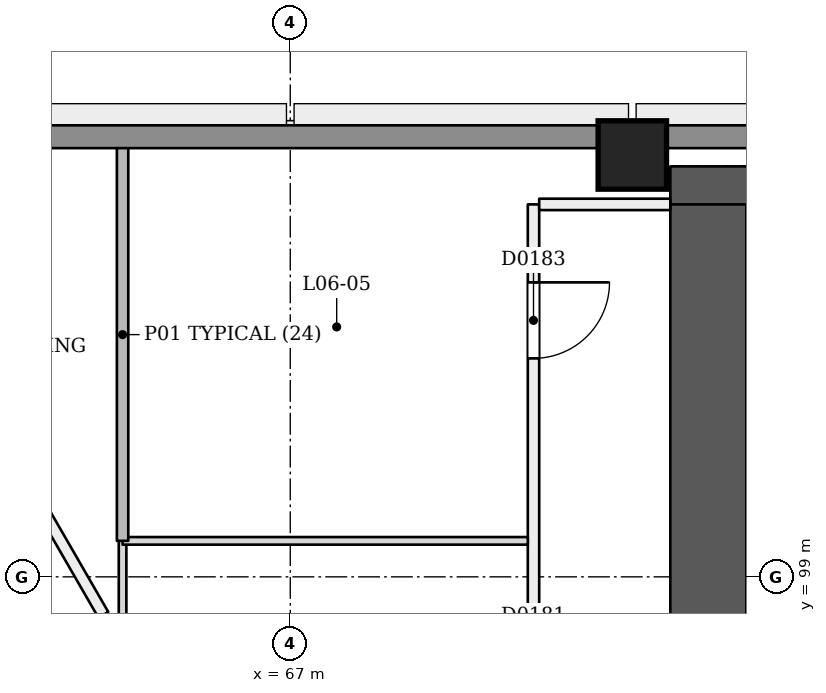
"""IFC4 building model, lengths in metres.
Left out: names, types, materials, properties, quantities, classifications, styles, units other than length and angle.
Written with IfcOpenShell. Run it as: python <this file> out.ifc"""

import sys

from ifc_helpers import new_model, si_unit, direction, frame, frame_2d, origin, origin_2d, place, context, subcontext, project, spatial, rectangle, extrude, element, fill, save


model = new_model("IFC4")
c1 = context("Model", 3, precision=1e-05, world=origin(), true_north=direction((0.0, 1.0)))
c2 = subcontext(c1, "Body", "Model", "MODEL_VIEW")
j1 = project(units=[si_unit("LENGTHUNIT", "METRE"), si_unit("PLANEANGLEUNIT", "RADIAN")], contexts=[c1])
p1 = place(None, origin())
s1 = spatial("IfcSite", under=j1, at=p1, CompositionType="ELEMENT")
p2 = place(p1, origin())
s2 = spatial("IfcBuilding", under=s1, at=p2, CompositionType="ELEMENT")
p3 = place(p2, frame((0.0, 0.0, 30.6)))
s3 = spatial("IfcBuildingStorey", under=s2, at=p3, CompositionType="ELEMENT", Elevation=30.6)
p4 = place(p3, frame((97.5, 103.9, 0.0), z_axis=(0.0, 0.0, 1.0), x_axis=(-1.0, 0.0, 0.0)))
e1 = element("IfcWall", 1, at=p4, inside=s3, PredefinedType="SHEAR", context=c2, shape_type="SweptSolid", body=[
    extrude(rectangle(XDim=25.5, YDim=1.0, at=frame_2d((12.75, 0.0))), origin(), (0.0, 0.0, 1.0), 3.6),
])
p5 = place(p3, frame((72.5, 103.9, 0.0), z_axis=(0.0, 0.0, 1.0), x_axis=(0.0, -1.0, 0.0)))
e2 = element("IfcWall", 2, at=p5, inside=s3, PredefinedType="SHEAR", context=c2, shape_type="SweptSolid", body=[
    extrude(rectangle(XDim=11.5, YDim=1.0, at=frame_2d((5.75, 0.0))), origin(), (0.0, 0.0, 1.0), 3.6),
])
p6 = place(p3, frame((71.5, 104.55, 0.0), z_axis=(0.0, 0.0, 1.0), x_axis=(1.0, 0.0, 0.0)))
e3 = element("IfcColumn", 3, at=p6, inside=s3, PredefinedType="COLUMN", context=c2, shape_type="SweptSolid", body=[
    extrude(rectangle(XDim=0.9, YDim=0.9, at=origin_2d()), origin(), (0.0, 0.0, 1.0), 3.6),
])
p7 = place(p3, frame((70.2, 103.9, 0.0), z_axis=(0.0, 0.0, 1.0), x_axis=(0.0, -1.0, 0.0)))
e4 = element("IfcWall", 4, at=p7, inside=s3, PredefinedType="PARTITIONING", context=c2, shape_type="SweptSolid", body=[
    extrude(rectangle(XDim=11.5, YDim=0.15, at=frame_2d((5.75, 0.0))), origin(), (0.0, 0.0, 1.0), 2.6),
])
p8 = place(p7, frame((9.253, 0.0, 0.0)))
e5 = element("IfcOpeningElement", 5, at=p8, cuts=e4, PredefinedType="OPENING", context=c2, shape_type="SweptSolid", body=[
    extrude(rectangle(XDim=0.9, YDim=2.1, at=frame_2d((0.45, 1.05))), frame((0.0, 0.085, 0.0), z_axis=(0.0, -1.0, 0.0), x_axis=(1.0, 0.0, 0.0)), (0.0, 0.0, 1.0), 0.171),
])
p9 = place(p7, frame((5.76, 0.0, 0.0)))
e6 = element("IfcOpeningElement", 6, at=p9, cuts=e4, PredefinedType="OPENING", context=c2, shape_type="SweptSolid", body=[
    extrude(rectangle(XDim=0.9, YDim=2.1, at=frame_2d((0.45, 1.05))), frame((0.0, 0.085, 0.0), z_axis=(0.0, -1.0, 0.0), x_axis=(1.0, 0.0, 0.0)), (0.0, 0.0, 1.0), 0.171),
])
p10 = place(p7, frame((1.026, 0.0, 0.0)))
e7 = element("IfcOpeningElement", 7, at=p10, cuts=e4, PredefinedType="OPENING", context=c2, shape_type="SweptSolid", body=[
    extrude(rectangle(XDim=1.0, YDim=2.1, at=frame_2d((0.5, 1.05))), frame((0.0, 0.085, 0.0), z_axis=(0.0, -1.0, 0.0), x_axis=(1.0, 0.0, 0.0)), (0.0, 0.0, 1.0), 0.171),
])
p11 = place(p3, frame((63.333, 96.406, 0.0), z_axis=(0.0, 0.0, 1.0), x_axis=(0.500016772967, 0.866015719691, 0.0)))
e8 = element("IfcWall", 8, at=p11, inside=s3, PredefinedType="PARTITIONING", context=c2, shape_type="SweptSolid", body=[
    extrude(rectangle(XDim=2.417, YDim=0.15, at=frame_2d((1.209, 0.0))), origin(), (0.0, 0.0, 1.0), 3.1),
])
p12 = place(p3, frame((64.541, 98.5, 0.0), z_axis=(0.0, 0.0, 1.0), x_axis=(-0.500005024956, 0.866022502605, 0.0)))
e9 = element("IfcWall", 9, at=p12, inside=s3, PredefinedType="PARTITIONING", context=c2, shape_type="SweptSolid", body=[
    extrude(rectangle(XDim=2.194, YDim=0.15, at=frame_2d((1.097, 0.0))), origin(), (0.0, 0.0, 1.0), 3.1),
])
p13 = place(p3, frame((72.0, 103.9, 0.0), z_axis=(0.0, 0.0, 1.0), x_axis=(-1.0, 0.0, 0.0)))
e10 = element("IfcWall", 10, at=p13, inside=s3, PredefinedType="PARTITIONING", context=c2, shape_type="SweptSolid", body=[
    extrude(rectangle(XDim=1.725, YDim=0.15, at=frame_2d((0.863, 0.0))), origin(), (0.0, 0.0, 1.0), 2.6),
])
p14 = place(p3, frame((64.794, 99.493, 0.0), z_axis=(0.0, 0.0, 1.0), x_axis=(0.0, -1.0, 0.0)))
e11 = element("IfcWall", 11, at=p14, inside=s3, PredefinedType="PARTITIONING", context=c2, shape_type="SweptSolid", body=[
    extrude(rectangle(XDim=5.381, YDim=0.1, at=frame_2d((2.691, 0.0))), origin(), (0.0, 0.0, 1.0), 3.1),
])
p15 = place(p3, frame((70.125, 99.474, 0.0), z_axis=(0.0, 0.0, 1.0), x_axis=(-1.0, 0.0, 0.0)))
e12 = element("IfcWall", 12, at=p15, inside=s3, PredefinedType="PARTITIONING", context=c2, shape_type="SweptSolid", body=[
    extrude(rectangle(XDim=5.331, YDim=0.1, at=frame_2d((2.666, 0.0))), origin(), (0.0, 0.0, 1.0), 3.1),
])
p16 = place(p3, frame((64.794, 99.474, 0.0), z_axis=(0.0, 0.0, 1.0), x_axis=(0.0, 1.0, 0.0)))
e13 = element("IfcWall", 13, at=p16, inside=s3, PredefinedType="PARTITIONING", context=c2, shape_type="SweptSolid", body=[
    extrude(rectangle(XDim=5.426, YDim=0.15, at=frame_2d((2.713, 0.0))), origin(), (0.0, 0.0, 1.0), 2.6),
])
p17 = place(p3, frame((58.71, 104.79, 0.0), z_axis=(0.0, 0.0, 1.0), x_axis=(1.0, 0.0, 0.0)))
e14 = element("IfcWall", 14, at=p17, inside=s3, PredefinedType="SOLIDWALL", context=c2, shape_type="SweptSolid", body=[
    extrude(rectangle(XDim=52.58, YDim=0.3, at=frame_2d((26.29, 0.0))), origin(), (0.0, 0.0, 1.0), 2.6),
])
p18 = place(p10, origin())
e15 = element("IfcDoor", 15, at=p18, inside=s3, OperationType="SINGLE_SWING_LEFT", PredefinedType="NOTDEFINED", context=c2, shape_type="SweptSolid", body=[
    extrude(rectangle(XDim=1.0, YDim=2.1, at=frame_2d((0.5, 1.05))), frame((0.0, 0.025, 0.0), z_axis=(0.0, -1.0, 0.0), x_axis=(1.0, 0.0, 0.0)), (0.0, 0.0, 1.0), 0.05),
])
fill(e7, e15)
save(model, sys.argv[1])
